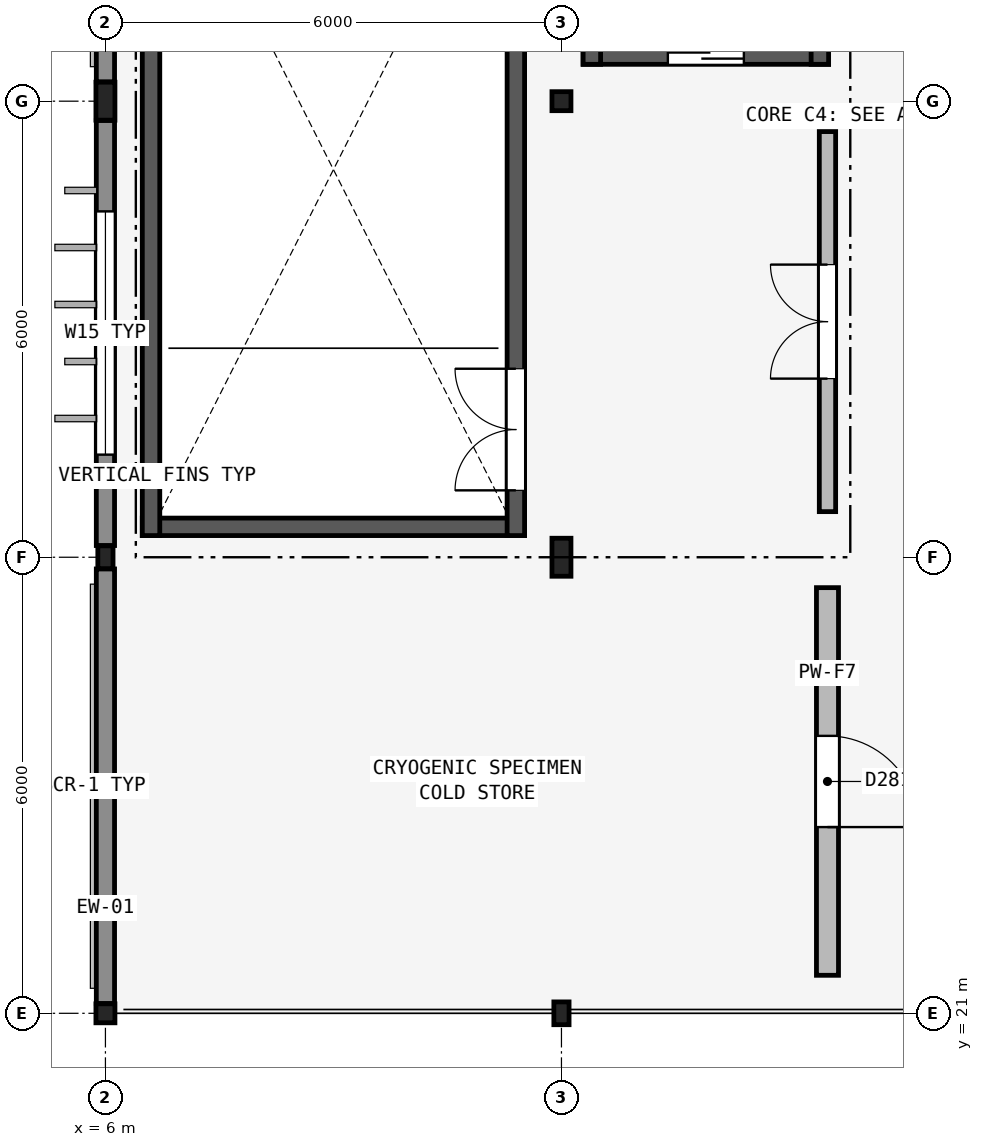
"""IFC4 building model, lengths in metres.
Left out: names, types, materials, properties, quantities, classifications, styles, units other than length and angle.
Written with IfcOpenShell. Run it as: python <this file> out.ifc"""

import sys

from ifc_helpers import new_model, si_unit, direction, frame, frame_2d, origin, origin_2d, place, context, subcontext, project, spatial, rectangle, hollow_rectangle, i_section, extrude, element, fill, save


model = new_model("IFC4")
c1 = context("Model", 3, precision=1e-05, world=origin(), true_north=direction((0.0, 1.0)))
c2 = subcontext(c1, "Body", "Model", "MODEL_VIEW")
j1 = project(units=[si_unit("LENGTHUNIT", "METRE"), si_unit("PLANEANGLEUNIT", "RADIAN")], contexts=[c1])
p1 = place(None, origin())
s1 = spatial("IfcSite", under=j1, at=p1, CompositionType="ELEMENT")
p2 = place(p1, origin())
s2 = spatial("IfcBuilding", under=s1, at=p2, CompositionType="ELEMENT")
p3 = place(p2, frame((0.0, 0.0, 22.2)))
s3 = spatial("IfcBuildingStorey", under=s2, at=p3, CompositionType="ELEMENT", Elevation=22.2)
p4 = place(p3, frame((6.0, 21.0, 0.0), z_axis=(0.0, 0.0, 1.0), x_axis=(1.0, 0.0, 0.0)))
e1 = element("IfcColumn", 1, at=p4, inside=s3, PredefinedType="COLUMN", context=c2, shape_type="SweptSolid", body=[
    extrude(hollow_rectangle(XDim=0.25, YDim=0.25, WallThickness=0.012, InnerFilletRadius=0.012, OuterFilletRadius=0.024, at=origin_2d()), origin(), (0.0, 0.0, 1.0), 3.9),
])
p5 = place(p3, frame((6.0, 27.0, 0.0), z_axis=(0.0, 0.0, 1.0), x_axis=(1.0, 0.0, 0.0)))
e2 = element("IfcColumn", 2, at=p5, inside=s3, PredefinedType="COLUMN", context=c2, shape_type="SweptSolid", body=[
    extrude(hollow_rectangle(XDim=0.2, YDim=0.3, WallThickness=0.012, InnerFilletRadius=0.012, OuterFilletRadius=0.024, at=origin_2d()), origin(), (0.0, 0.0, 1.0), 3.9),
])
p6 = place(p3, frame((6.0, 33.0, 0.0), z_axis=(0.0, 0.0, 1.0), x_axis=(1.0, 0.0, 0.0)))
e3 = element("IfcColumn", 3, at=p6, inside=s3, PredefinedType="COLUMN", context=c2, shape_type="SweptSolid", body=[
    extrude(i_section(OverallWidth=0.25, OverallDepth=0.5, WebThickness=0.01, FlangeThickness=0.015, FilletRadius=0.015, at=origin_2d()), origin(), (0.0, 0.0, 1.0), 3.9),
])
p7 = place(p3, frame((12.0, 21.0, 0.0), z_axis=(0.0, 0.0, 1.0), x_axis=(1.0, 0.0, 0.0)))
e4 = element("IfcColumn", 4, at=p7, inside=s3, PredefinedType="COLUMN", context=c2, shape_type="SweptSolid", body=[
    extrude(hollow_rectangle(XDim=0.2, YDim=0.3, WallThickness=0.012, InnerFilletRadius=0.012, OuterFilletRadius=0.024, at=origin_2d()), origin(), (0.0, 0.0, 1.0), 3.9),
])
p8 = place(p3, frame((12.0, 27.0, 0.0), z_axis=(0.0, 0.0, 1.0), x_axis=(1.0, 0.0, 0.0)))
e5 = element("IfcColumn", 5, at=p8, inside=s3, PredefinedType="COLUMN", context=c2, shape_type="SweptSolid", body=[
    extrude(i_section(OverallWidth=0.25, OverallDepth=0.5, WebThickness=0.01, FlangeThickness=0.015, FilletRadius=0.015, at=origin_2d()), origin(), (0.0, 0.0, 1.0), 3.9),
])
p9 = place(p3, frame((12.0, 33.0, 0.0), z_axis=(0.0, 0.0, 1.0), x_axis=(1.0, 0.0, 0.0)))
e6 = element("IfcColumn", 6, at=p9, inside=s3, PredefinedType="COLUMN", context=c2, shape_type="SweptSolid", body=[
    extrude(hollow_rectangle(XDim=0.25, YDim=0.25, WallThickness=0.012, InnerFilletRadius=0.012, OuterFilletRadius=0.024, at=origin_2d()), origin(), (0.0, 0.0, 1.0), 3.9),
])
p10 = place(p3, frame((6.0, 21.129, 0.0), z_axis=(0.0, 0.0, 1.0), x_axis=(0.0, 1.0, 0.0)))
e7 = element("IfcWall", 7, at=p10, inside=s3, PredefinedType="SOLIDWALL", context=c2, shape_type="SweptSolid", body=[
    extrude(rectangle(XDim=5.717, YDim=0.24, at=frame_2d((2.858, 0.0))), origin(), (0.0, 0.0, 1.0), 3.18),
])
p11 = place(p3, frame((6.0, 27.154, 0.0), z_axis=(0.0, 0.0, 1.0), x_axis=(0.0, 1.0, 0.0)))
e8 = element("IfcWall", 8, at=p11, inside=s3, PredefinedType="SOLIDWALL", context=c2, shape_type="SweptSolid", body=[
    extrude(rectangle(XDim=5.592, YDim=0.24, at=frame_2d((2.796, 0.0))), origin(), (0.0, 0.0, 1.0), 3.18),
])
p12 = place(p11, frame((1.196, 0.0, 0.8)))
e9 = element("IfcOpeningElement", 9, at=p12, cuts=e8, PredefinedType="OPENING", context=c2, shape_type="SweptSolid", body=[
    extrude(rectangle(XDim=3.2, YDim=1.8, at=frame_2d((1.6, 0.9))), frame((0.0, 0.13, 0.0), z_axis=(0.0, -1.0, 0.0), x_axis=(1.0, 0.0, 0.0)), (0.0, 0.0, 1.0), 0.26),
])
p13 = place(p3, frame((6.0, 33.254, 0.0), z_axis=(0.0, 0.0, 1.0), x_axis=(0.0, 1.0, 0.0)))
e10 = element("IfcWall", 10, at=p13, inside=s3, PredefinedType="SOLIDWALL", context=c2, shape_type="SweptSolid", body=[
    extrude(rectangle(XDim=5.617, YDim=0.24, at=frame_2d((2.809, 0.0))), origin(), (0.0, 0.0, 1.0), 3.23),
])
p14 = place(p3, frame((6.485, 27.4, 0.0), z_axis=(0.0, 0.0, 1.0), x_axis=(1.0, 0.0, 0.0)))
e11 = element("IfcWall", 11, at=p14, inside=s3, PredefinedType="SHEAR", context=c2, shape_type="SweptSolid", body=[
    extrude(rectangle(XDim=5.03, YDim=0.23, at=frame_2d((2.515, 0.0))), origin(), (0.0, 0.0, 1.0), 3.76),
])
p15 = place(p3, frame((11.4, 27.285, 0.0), z_axis=(0.0, 0.0, 1.0), x_axis=(0.0, 1.0, 0.0)))
e12 = element("IfcWall", 12, at=p15, inside=s3, PredefinedType="SHEAR", context=c2, shape_type="SweptSolid", body=[
    extrude(rectangle(XDim=9.63, YDim=0.23, at=frame_2d((4.815, 0.0))), origin(), (0.0, 0.0, 1.0), 3.76),
])
p16 = place(p15, frame((0.595, 0.0, 0.0)))
e13 = element("IfcOpeningElement", 13, at=p16, cuts=e12, PredefinedType="OPENING", context=c2, shape_type="SweptSolid", body=[
    extrude(rectangle(XDim=1.6, YDim=2.2, at=frame_2d((0.8, 1.1))), frame((0.0, 0.125, 0.0), z_axis=(0.0, -1.0, 0.0), x_axis=(1.0, 0.0, 0.0)), (0.0, 0.0, 1.0), 0.25),
])
p17 = place(p3, frame((6.6, 36.915, 0.0), z_axis=(0.0, 0.0, 1.0), x_axis=(0.0, -1.0, 0.0)))
e14 = element("IfcWall", 14, at=p17, inside=s3, PredefinedType="SHEAR", context=c2, shape_type="SweptSolid", body=[
    extrude(rectangle(XDim=9.63, YDim=0.23, at=frame_2d((4.815, 0.0))), origin(), (0.0, 0.0, 1.0), 3.76),
])
p18 = place(p3, frame((15.5, 27.6, 0.0), z_axis=(0.0, 0.0, 1.0), x_axis=(0.0, 1.0, 0.0)))
e15 = element("IfcWall", 15, at=p18, inside=s3, PredefinedType="PARTITIONING", context=c2, shape_type="SweptSolid", body=[
    extrude(rectangle(XDim=5.0, YDim=0.215, at=frame_2d((2.5, 0.0))), origin(), (0.0, 0.0, 1.0), 3.68),
])
p19 = place(p18, frame((1.75, 0.0, 0.0)))
e16 = element("IfcOpeningElement", 16, at=p19, cuts=e15, PredefinedType="OPENING", context=c2, shape_type="SweptSolid", body=[
    extrude(rectangle(XDim=1.5, YDim=2.15, at=frame_2d((0.75, 1.075))), frame((0.0, 0.117, 0.0), z_axis=(0.0, -1.0, 0.0), x_axis=(1.0, 0.0, 0.0)), (0.0, 0.0, 1.0), 0.235),
])
p20 = place(p3, frame((12.285, 33.6, 0.0), z_axis=(0.0, 0.0, 1.0), x_axis=(1.0, 0.0, 0.0)))
e17 = element("IfcWall", 17, at=p20, inside=s3, PredefinedType="SHEAR", context=c2, shape_type="SweptSolid", body=[
    extrude(rectangle(XDim=3.23, YDim=0.23, at=frame_2d((1.615, 0.0))), origin(), (0.0, 0.0, 1.0), 3.9),
])
p21 = place(p20, frame((1.115, 0.0, 0.0)))
e18 = element("IfcOpeningElement", 18, at=p21, cuts=e17, PredefinedType="OPENING", context=c2, shape_type="SweptSolid", body=[
    extrude(rectangle(XDim=1.0, YDim=2.15, at=frame_2d((0.5, 1.075))), frame((0.0, 0.125, 0.0), z_axis=(0.0, -1.0, 0.0), x_axis=(1.0, 0.0, 0.0)), (0.0, 0.0, 1.0), 0.25),
])
for number, where, z_axis, x_axis in (
    (19, (15.4, 33.485, 0.0), (0.0, 0.0, 1.0), (0.0, 1.0, 0.0)),
    (20, (12.4, 37.115, 0.0), (0.0, 0.0, 1.0), (0.0, -1.0, 0.0)),
):
    element("IfcWall", number, at=place(p3, frame(where, z_axis=z_axis, x_axis=x_axis)), inside=s3, PredefinedType="SHEAR", context=c2, shape_type="SweptSolid", body=[
        extrude(rectangle(XDim=3.63, YDim=0.23, at=frame_2d((1.815, 0.0))), origin(), (0.0, 0.0, 1.0), 3.9),
    ])
p22 = place(p3, frame((15.5, 26.6, 0.0), z_axis=(0.0, 0.0, 1.0), x_axis=(0.0, -1.0, 0.0)))
e21 = element("IfcWall", 21, at=p22, inside=s3, PredefinedType="PARTITIONING", context=c2, shape_type="SweptSolid", body=[
    extrude(rectangle(XDim=5.1, YDim=0.29, at=frame_2d((2.55, 0.0))), origin(), (0.0, 0.0, 1.0), 3.68),
])
p23 = place(p22, frame((1.95, 0.0, 0.0)))
e22 = element("IfcOpeningElement", 22, at=p23, cuts=e21, PredefinedType="OPENING", context=c2, shape_type="SweptSolid", body=[
    extrude(rectangle(XDim=1.2, YDim=2.15, at=frame_2d((0.6, 1.075))), frame((0.0, 0.155, 0.0), z_axis=(0.0, -1.0, 0.0), x_axis=(1.0, 0.0, 0.0)), (0.0, 0.0, 1.0), 0.31),
])
p24 = place(p12, origin())
e23 = element("IfcWindow", 23, at=p24, inside=s3, PartitioningType="SINGLE_PANEL", PredefinedType="WINDOW", context=c2, shape_type="SweptSolid", body=[
    extrude(rectangle(XDim=3.2, YDim=1.8, at=frame_2d((1.6, 0.9))), frame((0.0, 0.03, 0.0), z_axis=(0.0, -1.0, 0.0), x_axis=(1.0, 0.0, 0.0)), (0.0, 0.0, 1.0), 0.06),
])
fill(e9, e23)
p25 = place(p16, origin())
e24 = element("IfcDoor", 24, at=p25, inside=s3, OperationType="DOUBLE_DOOR_SINGLE_SWING", PredefinedType="DOOR", context=c2, shape_type="SweptSolid", body=[
    extrude(rectangle(XDim=1.6, YDim=2.2, at=frame_2d((0.8, 1.1))), frame((0.0, 0.025, 0.0), z_axis=(0.0, -1.0, 0.0), x_axis=(1.0, 0.0, 0.0)), (0.0, 0.0, 1.0), 0.05),
])
fill(e13, e24)
p26 = place(p19, origin())
e25 = element("IfcDoor", 25, at=p26, inside=s3, OperationType="DOUBLE_DOOR_SINGLE_SWING", PredefinedType="DOOR", context=c2, shape_type="SweptSolid", body=[
    extrude(rectangle(XDim=1.5, YDim=2.15, at=frame_2d((0.75, 1.075))), frame((0.0, 0.025, 0.0), z_axis=(0.0, -1.0, 0.0), x_axis=(1.0, 0.0, 0.0)), (0.0, 0.0, 1.0), 0.05),
])
fill(e16, e25)
p27 = place(p21, origin())
e26 = element("IfcDoor", 26, at=p27, inside=s3, OperationType="SLIDING_TO_LEFT", PredefinedType="DOOR", context=c2, shape_type="SweptSolid", body=[
    extrude(rectangle(XDim=1.0, YDim=2.15, at=frame_2d((0.5, 1.075))), frame((0.0, 0.025, 0.0), z_axis=(0.0, -1.0, 0.0), x_axis=(1.0, 0.0, 0.0)), (0.0, 0.0, 1.0), 0.05),
])
fill(e18, e26)
p28 = place(p23, origin())
e27 = element("IfcDoor", 27, at=p28, inside=s3, OperationType="SINGLE_SWING_RIGHT", PredefinedType="DOOR", context=c2, shape_type="SweptSolid", body=[
    extrude(rectangle(XDim=1.2, YDim=2.15, at=frame_2d((0.6, 1.075))), frame((0.0, 0.025, 0.0), z_axis=(0.0, -1.0, 0.0), x_axis=(1.0, 0.0, 0.0)), (0.0, 0.0, 1.0), 0.05),
])
fill(e22, e27)
save(model, sys.argv[1])
